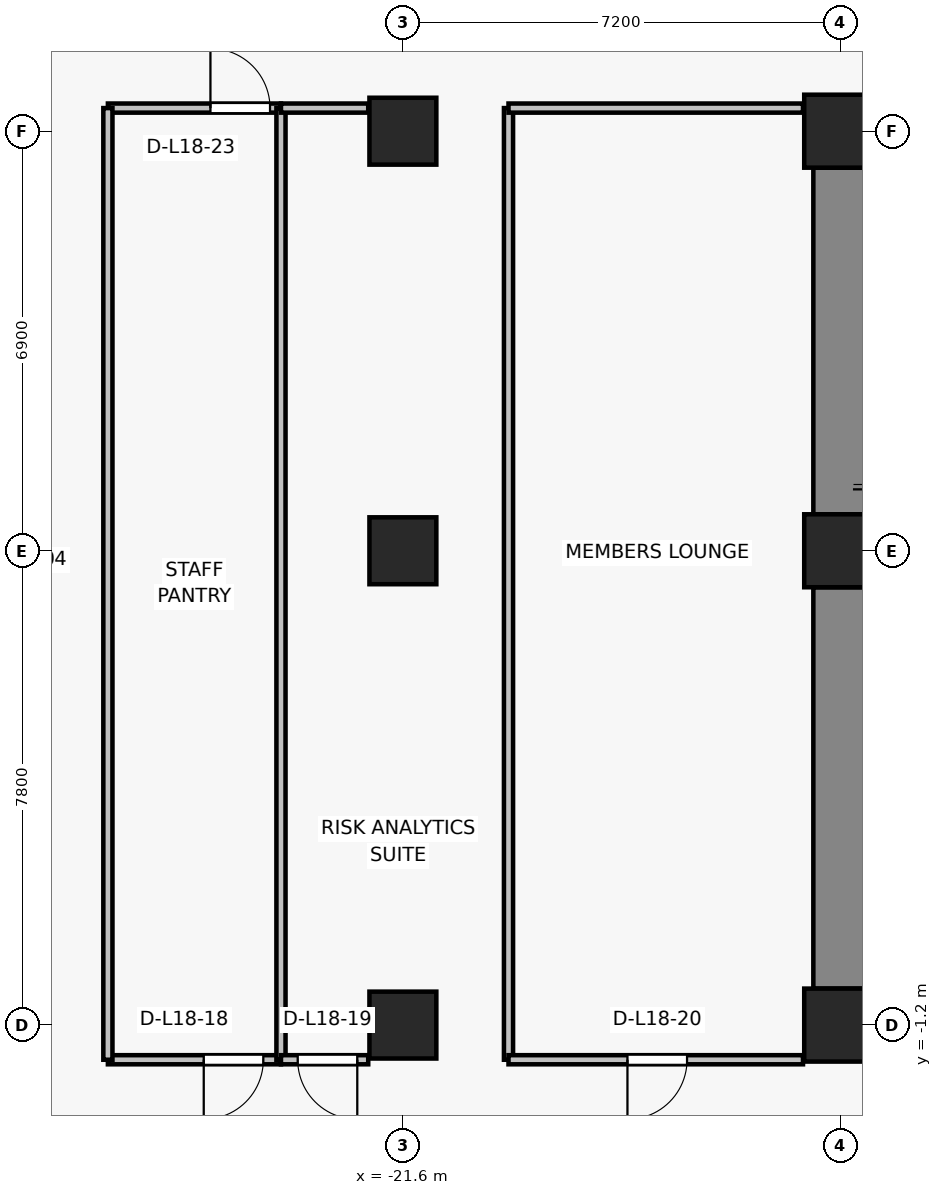
"""IFC4 building model, lengths in metres.
Left out: names, types, materials, properties, quantities, classifications, styles, units other than length and angle.
Written with IfcOpenShell. Run it as: python <this file> out.ifc"""

import sys

from ifc_helpers import new_model, si_unit, direction, frame, frame_2d, origin, origin_2d, place, context, subcontext, project, spatial, rectangle, extrude, source, transform, mapped, element, fill, save


model = new_model("IFC4")
c1 = context("Model", 3, precision=1e-05, world=origin(), true_north=direction((0.0, 1.0)))
c2 = subcontext(c1, "Body", "Model", "MODEL_VIEW")
j1 = project(units=[si_unit("LENGTHUNIT", "METRE"), si_unit("PLANEANGLEUNIT", "RADIAN")], contexts=[c1])
p1 = place(None, origin())
s1 = spatial("IfcSite", under=j1, at=p1, CompositionType="ELEMENT")
p2 = place(p1, origin())
s2 = spatial("IfcBuilding", under=s1, at=p2, CompositionType="ELEMENT")
p3 = place(p2, frame((0.0, 0.0, 67.0)))
s3 = spatial("IfcBuildingStorey", under=s2, at=p3, CompositionType="ELEMENT", Elevation=67.0)
for number, where, z_axis, x_axis in (
    (1, (-14.4, -1.2, 0.0), (0.0, 0.0, 1.0), (1.0, 0.0, 0.0)),
    (2, (-14.4, 6.6, 0.0), (0.0, 0.0, 1.0), (1.0, 0.0, 0.0)),
    (3, (-14.4, 13.5, 0.0), (0.0, 0.0, 1.0), (1.0, 0.0, 0.0)),
):
    element("IfcColumn", number, at=place(p3, frame(where, z_axis=z_axis, x_axis=x_axis)), inside=s3, PredefinedType="COLUMN", context=c2, shape_type="SweptSolid", body=[
        extrude(rectangle(XDim=1.2, YDim=1.2, at=origin_2d()), origin(), (0.0, 0.0, 1.0), 3.3),
    ])
for number, where, z_axis, x_axis in (
    (4, (-21.6, -1.2, 0.0), (0.0, 0.0, 1.0), (1.0, 0.0, 0.0)),
    (5, (-21.6, 6.6, 0.0), (0.0, 0.0, 1.0), (1.0, 0.0, 0.0)),
    (6, (-21.6, 13.5, 0.0), (0.0, 0.0, 1.0), (1.0, 0.0, 0.0)),
):
    element("IfcColumn", number, at=place(p3, frame(where, z_axis=z_axis, x_axis=x_axis)), inside=s3, PredefinedType="COLUMN", context=c2, shape_type="SweptSolid", body=[
        extrude(rectangle(XDim=1.1, YDim=1.1, at=origin_2d()), origin(), (0.0, 0.0, 1.0), 3.3),
    ])
p4 = place(p3, frame((-14.4, -0.6, 0.0), z_axis=(0.0, 0.0, 1.0), x_axis=(0.0, 1.0, 0.0)))
e7 = element("IfcWall", 7, at=p4, inside=s3, PredefinedType="SHEAR", context=c2, shape_type="SweptSolid", body=[
    extrude(rectangle(XDim=6.6, YDim=0.9, at=frame_2d((3.3, 0.0))), origin(), (0.0, 0.0, 1.0), 3.075),
])
p5 = place(p3, frame((-14.4, 7.2, 0.0), z_axis=(0.0, 0.0, 1.0), x_axis=(0.0, 1.0, 0.0)))
e8 = element("IfcWall", 8, at=p5, inside=s3, PredefinedType="SHEAR", context=c2, shape_type="SweptSolid", body=[
    extrude(rectangle(XDim=5.7, YDim=0.9, at=frame_2d((2.85, 0.0))), origin(), (0.0, 0.0, 1.0), 3.075),
])
p6 = place(p3, frame((-23.605, -1.77, 0.0), z_axis=(0.0, 0.0, 1.0), x_axis=(-1.0, 0.0, 0.0)))
e9 = element("IfcWall", 9, at=p6, inside=s3, PredefinedType="PARTITIONING", context=c2, shape_type="SweptSolid", body=[
    extrude(rectangle(XDim=2.846, YDim=0.15, at=frame_2d((1.423, 0.0))), origin(), (0.0, 0.0, 1.0), 3.075),
])
p7 = place(p6, frame((0.29, 0.0, 0.0)))
e10 = element("IfcOpeningElement", 10, at=p7, cuts=e9, PredefinedType="OPENING", context=c2, shape_type="SweptSolid", body=[
    extrude(rectangle(XDim=0.98, YDim=2.15, at=frame_2d((0.49, 1.075))), frame((0.0, 0.085, 0.0), z_axis=(0.0, -1.0, 0.0), x_axis=(1.0, 0.0, 0.0)), (0.0, 0.0, 1.0), 0.17),
])
p8 = place(p3, frame((-26.451, 13.88, 0.0), z_axis=(0.0, 0.0, 1.0), x_axis=(1.0, 0.0, 0.0)))
e11 = element("IfcWall", 11, at=p8, inside=s3, PredefinedType="PARTITIONING", context=c2, shape_type="SweptSolid", body=[
    extrude(rectangle(XDim=2.846, YDim=0.15, at=frame_2d((1.423, 0.0))), origin(), (0.0, 0.0, 1.0), 3.075),
])
p9 = place(p8, frame((1.686, 0.0, 0.0)))
e12 = element("IfcOpeningElement", 12, at=p9, cuts=e11, PredefinedType="OPENING", context=c2, shape_type="SweptSolid", body=[
    extrude(rectangle(XDim=0.98, YDim=2.15, at=frame_2d((0.49, 1.075))), frame((0.0, 0.085, 0.0), z_axis=(0.0, -1.0, 0.0), x_axis=(1.0, 0.0, 0.0)), (0.0, 0.0, 1.0), 0.17),
])
for number, where, z_axis, x_axis in (
    (13, (-26.451, -1.77, 0.0), (0.0, 0.0, 1.0), (0.0, 1.0, 0.0)),
    (14, (-23.605, 13.88, 0.0), (0.0, 0.0, 1.0), (0.0, -1.0, 0.0)),
):
    element("IfcWall", number, at=place(p3, frame(where, z_axis=z_axis, x_axis=x_axis)), inside=s3, PredefinedType="PARTITIONING", context=c2, shape_type="SweptSolid", body=[
        extrude(rectangle(XDim=15.65, YDim=0.15, at=frame_2d((7.825, 0.0))), origin(), (0.0, 0.0, 1.0), 2.465),
    ])
p10 = place(p3, frame((-22.17, -1.77, 0.0), z_axis=(0.0, 0.0, 1.0), x_axis=(-1.0, 0.0, 0.0)))
e15 = element("IfcWall", 15, at=p10, inside=s3, PredefinedType="PARTITIONING", context=c2, shape_type="SweptSolid", body=[
    extrude(rectangle(XDim=1.435, YDim=0.15, at=frame_2d((0.718, 0.0))), origin(), (0.0, 0.0, 1.0), 3.075),
])
p11 = place(p10, frame((0.18, 0.0, 0.0)))
e16 = element("IfcOpeningElement", 16, at=p11, cuts=e15, PredefinedType="OPENING", context=c2, shape_type="SweptSolid", body=[
    extrude(rectangle(XDim=0.98, YDim=2.15, at=frame_2d((0.49, 1.075))), frame((0.0, 0.085, 0.0), z_axis=(0.0, -1.0, 0.0), x_axis=(1.0, 0.0, 0.0)), (0.0, 0.0, 1.0), 0.17),
])
p12 = place(p3, frame((-23.605, 13.88, 0.0), z_axis=(0.0, 0.0, 1.0), x_axis=(1.0, 0.0, 0.0)))
e17 = element("IfcWall", 17, at=p12, inside=s3, PredefinedType="PARTITIONING", context=c2, shape_type="SweptSolid", body=[
    extrude(rectangle(XDim=1.435, YDim=0.15, at=frame_2d((0.718, 0.0))), origin(), (0.0, 0.0, 1.0), 3.075),
])
p13 = place(p3, frame((-19.863, 13.88, 0.0), z_axis=(0.0, 0.0, 1.0), x_axis=(0.0, -1.0, 0.0)))
e18 = element("IfcWall", 18, at=p13, inside=s3, PredefinedType="PARTITIONING", context=c2, shape_type="SweptSolid", body=[
    extrude(rectangle(XDim=15.65, YDim=0.15, at=frame_2d((7.825, 0.0))), origin(), (0.0, 0.0, 1.0), 2.465),
])
p14 = place(p3, frame((-15.02, -1.77, 0.0), z_axis=(0.0, 0.0, 1.0), x_axis=(-1.0, 0.0, 0.0)))
e19 = element("IfcWall", 19, at=p14, inside=s3, PredefinedType="PARTITIONING", context=c2, shape_type="SweptSolid", body=[
    extrude(rectangle(XDim=4.843, YDim=0.15, at=frame_2d((2.421, 0.0))), origin(), (0.0, 0.0, 1.0), 3.075),
])
p15 = place(p14, frame((1.907, 0.0, 0.0)))
e20 = element("IfcOpeningElement", 20, at=p15, cuts=e19, PredefinedType="OPENING", context=c2, shape_type="SweptSolid", body=[
    extrude(rectangle(XDim=0.98, YDim=2.15, at=frame_2d((0.49, 1.075))), frame((0.0, 0.085, 0.0), z_axis=(0.0, -1.0, 0.0), x_axis=(1.0, 0.0, 0.0)), (0.0, 0.0, 1.0), 0.17),
])
p16 = place(p3, frame((-19.863, 13.88, 0.0), z_axis=(0.0, 0.0, 1.0), x_axis=(1.0, 0.0, 0.0)))
e21 = element("IfcWall", 21, at=p16, inside=s3, PredefinedType="PARTITIONING", context=c2, shape_type="SweptSolid", body=[
    extrude(rectangle(XDim=4.843, YDim=0.15, at=frame_2d((2.421, 0.0))), origin(), (0.0, 0.0, 1.0), 3.075),
])
m1 = source(origin(), c2, "Body", "SweptSolid", [
    extrude(rectangle(XDim=0.98, YDim=2.15, at=frame_2d((0.49, 1.075))), frame((0.0, 0.025, 0.0), z_axis=(0.0, -1.0, 0.0), x_axis=(1.0, 0.0, 0.0)), (0.0, 0.0, 1.0), 0.05),
])
p17 = place(p7, origin())
e22 = element("IfcDoor", 22, at=p17, inside=s3, OperationType="SINGLE_SWING_RIGHT", PredefinedType="DOOR", context=c2, shape_type="MappedRepresentation", body=[
    mapped(m1, transform((0.0, 0.0, 0.0), x_axis=(1.0, 0.0, 0.0), y_axis=(0.0, 1.0, 0.0), z_axis=(0.0, 0.0, 1.0), scale=1.0)),
])
fill(e10, e22)
p18 = place(p11, origin())
e23 = element("IfcDoor", 23, at=p18, inside=s3, OperationType="SINGLE_SWING_LEFT", PredefinedType="DOOR", context=c2, shape_type="MappedRepresentation", body=[
    mapped(m1, transform((0.0, 0.0, 0.0), x_axis=(1.0, 0.0, 0.0), y_axis=(0.0, 1.0, 0.0), z_axis=(0.0, 0.0, 1.0), scale=1.0)),
])
fill(e16, e23)
p19 = place(p15, origin())
e24 = element("IfcDoor", 24, at=p19, inside=s3, OperationType="SINGLE_SWING_RIGHT", PredefinedType="DOOR", context=c2, shape_type="MappedRepresentation", body=[
    mapped(m1, transform((0.0, 0.0, 0.0), x_axis=(1.0, 0.0, 0.0), y_axis=(0.0, 1.0, 0.0), z_axis=(0.0, 0.0, 1.0), scale=1.0)),
])
fill(e20, e24)
p20 = place(p9, origin())
e25 = element("IfcDoor", 25, at=p20, inside=s3, OperationType="SINGLE_SWING_LEFT", PredefinedType="DOOR", context=c2, shape_type="MappedRepresentation", body=[
    mapped(m1, transform((0.0, 0.0, 0.0), x_axis=(1.0, 0.0, 0.0), y_axis=(0.0, 1.0, 0.0), z_axis=(0.0, 0.0, 1.0), scale=1.0)),
])
fill(e12, e25)
save(model, sys.argv[1])
